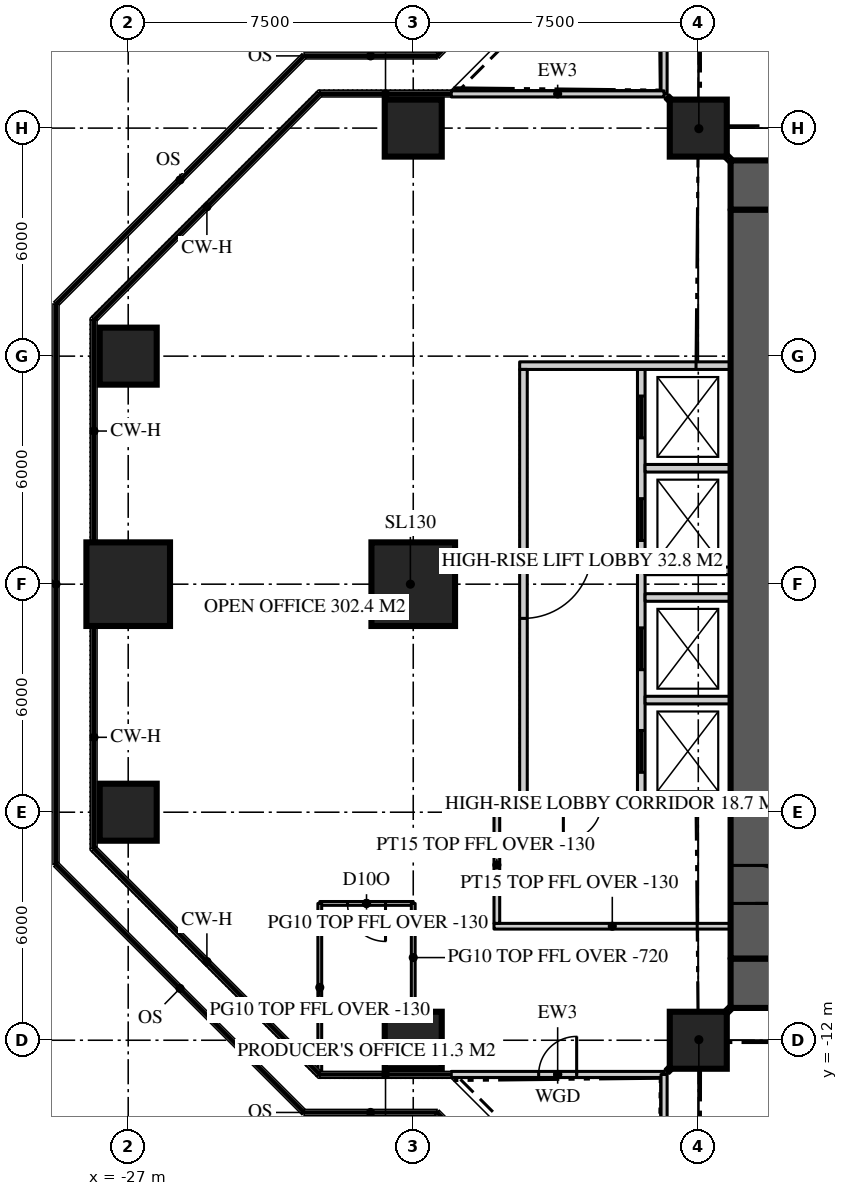
"""IFC4 building model, lengths in metres.
Left out: names, types, materials, properties, quantities, classifications, styles, units other than length and angle.
Written with IfcOpenShell. Run it as: python <this file> out.ifc"""

import sys

from ifc_helpers import new_model, si_unit, direction, frame, frame_2d, origin, origin_2d, place, context, subcontext, project, spatial, rectangle, extrude, element, fill, save


model = new_model("IFC4")
c1 = context("Model", 3, precision=1e-05, world=origin(), true_north=direction((0.0, 1.0)))
c2 = subcontext(c1, "Body", "Model", "MODEL_VIEW")
j1 = project(units=[si_unit("LENGTHUNIT", "METRE"), si_unit("PLANEANGLEUNIT", "RADIAN")], contexts=[c1])
p1 = place(None, origin())
s1 = spatial("IfcSite", under=j1, at=p1, CompositionType="ELEMENT")
p2 = place(p1, origin())
s2 = spatial("IfcBuilding", under=s1, at=p2, CompositionType="ELEMENT")
p3 = place(p2, frame((0.0, 0.0, 236.1)))
s3 = spatial("IfcBuildingStorey", under=s2, at=p3, CompositionType="ELEMENT", Elevation=236.1)
p4 = place(p3, frame((-11.15, 10.5, 0.0), z_axis=(0.0, 0.0, 1.0), x_axis=(1.0, 0.0, 0.0)))
e1 = element("IfcWall", 1, at=p4, inside=s3, PredefinedType="SHEAR", context=c2, shape_type="SweptSolid", body=[
    extrude(rectangle(XDim=22.3, YDim=1.3, at=frame_2d((11.15, 0.0))), origin(), (0.0, 0.0, 1.0), 3.9),
])
p5 = place(p4, frame((4.25, 0.0, 0.0)))
e2 = element("IfcOpeningElement", 2, at=p5, cuts=e1, PredefinedType="OPENING", context=c2, shape_type="SweptSolid", body=[
    extrude(rectangle(XDim=1.8, YDim=2.2, at=frame_2d((0.9, 1.1))), frame((0.0, 0.66, 0.0), z_axis=(0.0, -1.0, 0.0), x_axis=(1.0, 0.0, 0.0)), (0.0, 0.0, 1.0), 1.32),
])
p6 = place(p4, frame((16.25, 0.0, 0.0)))
e3 = element("IfcOpeningElement", 3, at=p6, cuts=e1, PredefinedType="OPENING", context=c2, shape_type="SweptSolid", body=[
    extrude(rectangle(XDim=1.8, YDim=2.2, at=frame_2d((0.9, 1.1))), frame((0.0, 0.66, 0.0), z_axis=(0.0, -1.0, 0.0), x_axis=(1.0, 0.0, 0.0)), (0.0, 0.0, 1.0), 1.32),
])
p7 = place(p3, frame((11.15, -10.5, 0.0), z_axis=(0.0, 0.0, 1.0), x_axis=(-1.0, 0.0, 0.0)))
e4 = element("IfcWall", 4, at=p7, inside=s3, PredefinedType="SHEAR", context=c2, shape_type="SweptSolid", body=[
    extrude(rectangle(XDim=22.3, YDim=1.3, at=frame_2d((11.15, 0.0))), origin(), (0.0, 0.0, 1.0), 3.9),
])
p8 = place(p7, frame((16.25, 0.0, 0.0)))
e5 = element("IfcOpeningElement", 5, at=p8, cuts=e4, PredefinedType="OPENING", context=c2, shape_type="SweptSolid", body=[
    extrude(rectangle(XDim=1.8, YDim=2.2, at=frame_2d((0.9, 1.1))), frame((0.0, 0.66, 0.0), z_axis=(0.0, -1.0, 0.0), x_axis=(1.0, 0.0, 0.0)), (0.0, 0.0, 1.0), 1.32),
])
p9 = place(p7, frame((4.25, 0.0, 0.0)))
e6 = element("IfcOpeningElement", 6, at=p9, cuts=e4, PredefinedType="OPENING", context=c2, shape_type="SweptSolid", body=[
    extrude(rectangle(XDim=1.8, YDim=2.2, at=frame_2d((0.9, 1.1))), frame((0.0, 0.66, 0.0), z_axis=(0.0, -1.0, 0.0), x_axis=(1.0, 0.0, 0.0)), (0.0, 0.0, 1.0), 1.32),
])
p10 = place(p3, frame((-10.5, 9.85, 0.0), z_axis=(0.0, 0.0, 1.0), x_axis=(0.0, -1.0, 0.0)))
e7 = element("IfcWall", 7, at=p10, inside=s3, PredefinedType="SHEAR", context=c2, shape_type="SweptSolid", body=[
    extrude(rectangle(XDim=19.7, YDim=1.3, at=frame_2d((9.85, 0.0))), origin(), (0.0, 0.0, 1.0), 3.9),
])
p11 = place(p10, frame((17.25, 0.0, 0.0)))
e8 = element("IfcOpeningElement", 8, at=p11, cuts=e7, PredefinedType="OPENING", context=c2, shape_type="SweptSolid", body=[
    extrude(rectangle(XDim=1.0, YDim=2.2, at=frame_2d((0.5, 1.1))), frame((0.0, 0.66, 0.0), z_axis=(0.0, -1.0, 0.0), x_axis=(1.0, 0.0, 0.0)), (0.0, 0.0, 1.0), 1.32),
])
for number, where, z_axis, x_axis in (
    (9, (-19.5, -12.0, 0.0), (0.0, 0.0, 1.0), (1.0, 0.0, 0.0)),
    (10, (-12.0, -12.0, 0.0), (0.0, 0.0, 1.0), (1.0, 0.0, 0.0)),
    (11, (-27.0, -6.0, 0.0), (0.0, 0.0, 1.0), (1.0, 0.0, 0.0)),
):
    element("IfcColumn", number, at=place(p3, frame(where, z_axis=z_axis, x_axis=x_axis)), inside=s3, PredefinedType="COLUMN", context=c2, shape_type="SweptSolid", body=[
        extrude(rectangle(XDim=1.5, YDim=1.5, at=origin_2d()), origin(), (0.0, 0.0, 1.0), 3.9),
    ])
for number, where, z_axis, x_axis in (
    (12, (-27.0, 0.0, 0.0), (0.0, 0.0, 1.0), (1.0, 0.0, 0.0)),
    (13, (-19.5, 0.0, 0.0), (0.0, 0.0, 1.0), (1.0, 0.0, 0.0)),
):
    element("IfcColumn", number, at=place(p3, frame(where, z_axis=z_axis, x_axis=x_axis)), inside=s3, PredefinedType="COLUMN", context=c2, shape_type="SweptSolid", body=[
        extrude(rectangle(XDim=2.2, YDim=2.2, at=origin_2d()), origin(), (0.0, 0.0, 1.0), 3.9),
    ])
for number, where, z_axis, x_axis in (
    (14, (-27.0, 6.0, 0.0), (0.0, 0.0, 1.0), (1.0, 0.0, 0.0)),
    (15, (-19.5, 12.0, 0.0), (0.0, 0.0, 1.0), (1.0, 0.0, 0.0)),
    (16, (-12.0, 12.0, 0.0), (0.0, 0.0, 1.0), (1.0, 0.0, 0.0)),
):
    element("IfcColumn", number, at=place(p3, frame(where, z_axis=z_axis, x_axis=x_axis)), inside=s3, PredefinedType="COLUMN", context=c2, shape_type="SweptSolid", body=[
        extrude(rectangle(XDim=1.5, YDim=1.5, at=origin_2d()), origin(), (0.0, 0.0, 1.0), 3.9),
    ])
p12 = place(p3, frame((-12.9, 18.5, 0.0), z_axis=(0.0, 0.0, 1.0), x_axis=(0.0, -1.0, 0.0)))
e17 = element("IfcWall", 17, at=p12, inside=s3, PredefinedType="SOLIDWALL", context=c2, shape_type="SweptSolid", body=[
    extrude(rectangle(XDim=5.6, YDim=0.16, at=frame_2d((2.8, 0.0))), origin(), (0.0, 0.0, 1.0), 3.77),
])
p13 = place(p12, frame((2.3, 0.0, 0.0)))
e18 = element("IfcOpeningElement", 18, at=p13, cuts=e17, PredefinedType="OPENING", context=c2, shape_type="SweptSolid", body=[
    extrude(rectangle(XDim=1.0, YDim=2.2, at=frame_2d((0.5, 1.1))), frame((0.0, 0.09, 0.0), z_axis=(0.0, -1.0, 0.0), x_axis=(1.0, 0.0, 0.0)), (0.0, 0.0, 1.0), 0.18),
])
p14 = place(p3, frame((-12.9, 12.9, 0.0), z_axis=(0.0, 0.0, 1.0), x_axis=(-1.0, 0.0, 0.0)))
e19 = element("IfcWall", 19, at=p14, inside=s3, PredefinedType="SOLIDWALL", context=c2, shape_type="SweptSolid", body=[
    extrude(rectangle(XDim=5.6, YDim=0.16, at=frame_2d((2.8, 0.0))), origin(), (0.0, 0.0, 1.0), 3.77),
])
p15 = place(p3, frame((-18.5, -12.9, 0.0), z_axis=(0.0, 0.0, 1.0), x_axis=(1.0, 0.0, 0.0)))
e20 = element("IfcWall", 20, at=p15, inside=s3, PredefinedType="SOLIDWALL", context=c2, shape_type="SweptSolid", body=[
    extrude(rectangle(XDim=5.6, YDim=0.16, at=frame_2d((2.8, 0.0))), origin(), (0.0, 0.0, 1.0), 3.77),
])
p16 = place(p15, frame((2.3, 0.0, 0.0)))
e21 = element("IfcOpeningElement", 21, at=p16, cuts=e20, PredefinedType="OPENING", context=c2, shape_type="SweptSolid", body=[
    extrude(rectangle(XDim=1.0, YDim=2.2, at=frame_2d((0.5, 1.1))), frame((0.0, 0.09, 0.0), z_axis=(0.0, -1.0, 0.0), x_axis=(1.0, 0.0, 0.0)), (0.0, 0.0, 1.0), 0.18),
])
p17 = place(p3, frame((-12.9, -12.9, 0.0), z_axis=(0.0, 0.0, 1.0), x_axis=(0.0, -1.0, 0.0)))
e22 = element("IfcWall", 22, at=p17, inside=s3, PredefinedType="SOLIDWALL", context=c2, shape_type="SweptSolid", body=[
    extrude(rectangle(XDim=5.6, YDim=0.16, at=frame_2d((2.8, 0.0))), origin(), (0.0, 0.0, 1.0), 3.77),
])
p18 = place(p3, frame((-19.5, -8.4, 0.0), z_axis=(0.0, 0.0, 1.0), x_axis=(-1.0, 0.0, 0.0)))
e23 = element("IfcWall", 23, at=p18, inside=s3, PredefinedType="PARTITIONING", context=c2, shape_type="SweptSolid", body=[
    extrude(rectangle(XDim=2.459, YDim=0.1, at=frame_2d((1.229, 0.0))), origin(), (0.0, 0.0, 1.0), 3.77),
])
p19 = place(p18, frame((0.729, 0.0, 0.0)))
e24 = element("IfcOpeningElement", 24, at=p19, cuts=e23, PredefinedType="OPENING", context=c2, shape_type="SweptSolid", body=[
    extrude(rectangle(XDim=1.0, YDim=2.2, at=frame_2d((0.5, 1.1))), frame((0.0, 0.06, 0.0), z_axis=(0.0, -1.0, 0.0), x_axis=(1.0, 0.0, 0.0)), (0.0, 0.0, 1.0), 0.12),
])
p20 = place(p3, frame((-19.5, -8.4, 0.0), z_axis=(0.0, 0.0, 1.0), x_axis=(0.0, -1.0, 0.0)))
e25 = element("IfcWall", 25, at=p20, inside=s3, PredefinedType="PARTITIONING", context=c2, shape_type="SweptSolid", body=[
    extrude(rectangle(XDim=2.85, YDim=0.1, at=frame_2d((1.425, 0.0))), origin(), (0.0, 0.0, 1.0), 3.18),
])
p21 = place(p3, frame((-21.959, -8.4, 0.0), z_axis=(0.0, 0.0, 1.0), x_axis=(0.0, -1.0, 0.0)))
e26 = element("IfcWall", 26, at=p21, inside=s3, PredefinedType="PARTITIONING", context=c2, shape_type="SweptSolid", body=[
    extrude(rectangle(XDim=4.42, YDim=0.1, at=frame_2d((2.21, 0.0))), origin(), (0.0, 0.0, 1.0), 3.77),
])
p22 = place(p3, frame((-13.5, 5.65, 0.0), z_axis=(0.0, 0.0, 1.0), x_axis=(0.0, -1.0, 0.0)))
e27 = element("IfcWall", 27, at=p22, inside=s3, PredefinedType="SOLIDWALL", context=c2, shape_type="SweptSolid", body=[
    extrude(rectangle(XDim=11.3, YDim=0.2, at=frame_2d((5.65, 0.0))), origin(), (0.0, 0.0, 1.0), 3.7),
])
p23 = place(p22, frame((0.7, 0.0, 0.0)))
e28 = element("IfcOpeningElement", 28, at=p23, cuts=e27, PredefinedType="OPENING", context=c2, shape_type="SweptSolid", body=[
    extrude(rectangle(XDim=1.1, YDim=2.2, at=frame_2d((0.55, 1.1))), frame((0.0, 0.11, 0.0), z_axis=(0.0, -1.0, 0.0), x_axis=(1.0, 0.0, 0.0)), (0.0, 0.0, 1.0), 0.22),
])
p24 = place(p22, frame((3.4, 0.0, 0.0)))
e29 = element("IfcOpeningElement", 29, at=p24, cuts=e27, PredefinedType="OPENING", context=c2, shape_type="SweptSolid", body=[
    extrude(rectangle(XDim=1.1, YDim=2.2, at=frame_2d((0.55, 1.1))), frame((0.0, 0.11, 0.0), z_axis=(0.0, -1.0, 0.0), x_axis=(1.0, 0.0, 0.0)), (0.0, 0.0, 1.0), 0.22),
])
p25 = place(p22, frame((6.8, 0.0, 0.0)))
e30 = element("IfcOpeningElement", 30, at=p25, cuts=e27, PredefinedType="OPENING", context=c2, shape_type="SweptSolid", body=[
    extrude(rectangle(XDim=1.1, YDim=2.2, at=frame_2d((0.55, 1.1))), frame((0.0, 0.11, 0.0), z_axis=(0.0, -1.0, 0.0), x_axis=(1.0, 0.0, 0.0)), (0.0, 0.0, 1.0), 0.22),
])
p26 = place(p22, frame((9.5, 0.0, 0.0)))
e31 = element("IfcOpeningElement", 31, at=p26, cuts=e27, PredefinedType="OPENING", context=c2, shape_type="SweptSolid", body=[
    extrude(rectangle(XDim=1.1, YDim=2.2, at=frame_2d((0.55, 1.1))), frame((0.0, 0.11, 0.0), z_axis=(0.0, -1.0, 0.0), x_axis=(1.0, 0.0, 0.0)), (0.0, 0.0, 1.0), 0.22),
])
p27 = place(p3, frame((-11.15, 5.75, 0.0), z_axis=(0.0, 0.0, 1.0), x_axis=(-1.0, 0.0, 0.0)))
e32 = element("IfcWall", 32, at=p27, inside=s3, PredefinedType="SOLIDWALL", context=c2, shape_type="SweptSolid", body=[
    extrude(rectangle(XDim=5.55, YDim=0.2, at=frame_2d((2.775, 0.0))), origin(), (0.0, 0.0, 1.0), 3.7),
])
p28 = place(p3, frame((-11.15, -5.75, 0.0), z_axis=(0.0, 0.0, 1.0), x_axis=(-1.0, 0.0, 0.0)))
e33 = element("IfcWall", 33, at=p28, inside=s3, PredefinedType="SOLIDWALL", context=c2, shape_type="SweptSolid", body=[
    extrude(rectangle(XDim=5.55, YDim=0.2, at=frame_2d((2.775, 0.0))), origin(), (0.0, 0.0, 1.0), 3.7),
])
p29 = place(p28, frame((3.4, 0.0, 0.0)))
e34 = element("IfcOpeningElement", 34, at=p29, cuts=e33, PredefinedType="OPENING", context=c2, shape_type="SweptSolid", body=[
    extrude(rectangle(XDim=1.0, YDim=2.2, at=frame_2d((0.5, 1.1))), frame((0.0, 0.11, 0.0), z_axis=(0.0, -1.0, 0.0), x_axis=(1.0, 0.0, 0.0)), (0.0, 0.0, 1.0), 0.22),
])
for number, where, z_axis, x_axis in (
    (35, (-11.15, 3.05, 0.0), (0.0, 0.0, 1.0), (-1.0, 0.0, 0.0)),
    (36, (-11.15, 0.35, 0.0), (0.0, 0.0, 1.0), (-1.0, 0.0, 0.0)),
    (37, (-11.15, -0.35, 0.0), (0.0, 0.0, 1.0), (-1.0, 0.0, 0.0)),
    (38, (-11.15, -3.05, 0.0), (0.0, 0.0, 1.0), (-1.0, 0.0, 0.0)),
):
    element("IfcWall", number, at=place(p3, frame(where, z_axis=z_axis, x_axis=x_axis)), inside=s3, PredefinedType="SOLIDWALL", context=c2, shape_type="SweptSolid", body=[
        extrude(rectangle(XDim=2.25, YDim=0.2, at=frame_2d((1.125, 0.0))), origin(), (0.0, 0.0, 1.0), 3.7),
    ])
p30 = place(p3, frame((-16.6, 5.65, 0.0), z_axis=(0.0, 0.0, 1.0), x_axis=(0.0, -1.0, 0.0)))
e39 = element("IfcWall", 39, at=p30, inside=s3, PredefinedType="SOLIDWALL", context=c2, shape_type="SweptSolid", body=[
    extrude(rectangle(XDim=11.3, YDim=0.2, at=frame_2d((5.65, 0.0))), origin(), (0.0, 0.0, 1.0), 3.18),
])
p31 = place(p30, frame((4.75, 0.0, 0.0)))
e40 = element("IfcOpeningElement", 40, at=p31, cuts=e39, PredefinedType="OPENING", context=c2, shape_type="SweptSolid", body=[
    extrude(rectangle(XDim=1.8, YDim=2.2, at=frame_2d((0.9, 1.1))), frame((0.0, 0.11, 0.0), z_axis=(0.0, -1.0, 0.0), x_axis=(1.0, 0.0, 0.0)), (0.0, 0.0, 1.0), 0.22),
])
for number, where, z_axis, x_axis in (
    (41, (-11.15, 11.15, 0.0), (0.0, 0.0, 1.0), (-0.707, 0.707, 0.0)),
    (42, (-11.15, -11.15, 0.0), (0.0, 0.0, 1.0), (-0.707, -0.707, 0.0)),
):
    element("IfcWall", number, at=place(p3, frame(where, z_axis=z_axis, x_axis=x_axis)), inside=s3, PredefinedType="PARTITIONING", context=c2, shape_type="SweptSolid", body=[
        extrude(rectangle(XDim=2.362, YDim=0.15, at=frame_2d((1.181, 0.0))), origin(), (0.0, 0.0, 1.0), 3.22),
    ])
p32 = place(p3, frame((-11.15, -9.0, 0.0), z_axis=(0.0, 0.0, 1.0), x_axis=(-1.0, 0.0, 0.0)))
e43 = element("IfcWall", 43, at=p32, inside=s3, PredefinedType="PARTITIONING", context=c2, shape_type="SweptSolid", body=[
    extrude(rectangle(XDim=6.225, YDim=0.15, at=frame_2d((3.113, 0.0))), origin(), (0.0, 0.0, 1.0), 3.77),
])
p33 = place(p3, frame((-17.3, -5.85, 0.0), z_axis=(0.0, 0.0, 1.0), x_axis=(0.0, -1.0, 0.0)))
e44 = element("IfcWall", 44, at=p33, inside=s3, PredefinedType="PARTITIONING", context=c2, shape_type="SweptSolid", body=[
    extrude(rectangle(XDim=3.075, YDim=0.15, at=frame_2d((1.538, 0.0))), origin(), (0.0, 0.0, 1.0), 3.77),
])
p34 = place(p16, origin())
e45 = element("IfcDoor", 45, at=p34, inside=s3, OperationType="SINGLE_SWING_RIGHT", PredefinedType="DOOR", context=c2, shape_type="SweptSolid", body=[
    extrude(rectangle(XDim=1.0, YDim=2.2, at=frame_2d((0.5, 1.1))), frame((0.0, 0.025, 0.0), z_axis=(0.0, -1.0, 0.0), x_axis=(1.0, 0.0, 0.0)), (0.0, 0.0, 1.0), 0.05),
])
fill(e21, e45)
p35 = place(p11, origin())
e46 = element("IfcDoor", 46, at=p35, inside=s3, OperationType="SINGLE_SWING_RIGHT", PredefinedType="DOOR", context=c2, shape_type="SweptSolid", body=[
    extrude(rectangle(XDim=1.0, YDim=2.2, at=frame_2d((0.5, 1.1))), frame((0.0, 0.025, 0.0), z_axis=(0.0, -1.0, 0.0), x_axis=(1.0, 0.0, 0.0)), (0.0, 0.0, 1.0), 0.05),
])
fill(e8, e46)
p36 = place(p19, origin())
e47 = element("IfcDoor", 47, at=p36, inside=s3, OperationType="SINGLE_SWING_LEFT", PredefinedType="DOOR", context=c2, shape_type="SweptSolid", body=[
    extrude(rectangle(XDim=1.0, YDim=2.2, at=frame_2d((0.5, 1.1))), frame((0.0, 0.025, 0.0), z_axis=(0.0, -1.0, 0.0), x_axis=(1.0, 0.0, 0.0)), (0.0, 0.0, 1.0), 0.05),
])
fill(e24, e47)
p37 = place(p31, origin())
e48 = element("IfcDoor", 48, at=p37, inside=s3, OperationType="DOUBLE_DOOR_DOUBLE_SWING", PredefinedType="DOOR", context=c2, shape_type="SweptSolid", body=[
    extrude(rectangle(XDim=1.8, YDim=2.2, at=frame_2d((0.9, 1.1))), frame((0.0, 0.025, 0.0), z_axis=(0.0, -1.0, 0.0), x_axis=(1.0, 0.0, 0.0)), (0.0, 0.0, 1.0), 0.05),
])
fill(e40, e48)
p38 = place(p23, origin())
e49 = element("IfcDoor", 49, at=p38, inside=s3, OperationType="SLIDING_TO_LEFT", PredefinedType="DOOR", context=c2, shape_type="SweptSolid", body=[
    extrude(rectangle(XDim=1.1, YDim=2.2, at=frame_2d((0.55, 1.1))), frame((0.0, 0.025, 0.0), z_axis=(0.0, -1.0, 0.0), x_axis=(1.0, 0.0, 0.0)), (0.0, 0.0, 1.0), 0.05),
])
fill(e28, e49)
p39 = place(p24, origin())
e50 = element("IfcDoor", 50, at=p39, inside=s3, OperationType="SLIDING_TO_LEFT", PredefinedType="DOOR", context=c2, shape_type="SweptSolid", body=[
    extrude(rectangle(XDim=1.1, YDim=2.2, at=frame_2d((0.55, 1.1))), frame((0.0, 0.025, 0.0), z_axis=(0.0, -1.0, 0.0), x_axis=(1.0, 0.0, 0.0)), (0.0, 0.0, 1.0), 0.05),
])
fill(e29, e50)
p40 = place(p25, origin())
e51 = element("IfcDoor", 51, at=p40, inside=s3, OperationType="SLIDING_TO_LEFT", PredefinedType="DOOR", context=c2, shape_type="SweptSolid", body=[
    extrude(rectangle(XDim=1.1, YDim=2.2, at=frame_2d((0.55, 1.1))), frame((0.0, 0.025, 0.0), z_axis=(0.0, -1.0, 0.0), x_axis=(1.0, 0.0, 0.0)), (0.0, 0.0, 1.0), 0.05),
])
fill(e30, e51)
p41 = place(p26, origin())
e52 = element("IfcDoor", 52, at=p41, inside=s3, OperationType="SLIDING_TO_LEFT", PredefinedType="DOOR", context=c2, shape_type="SweptSolid", body=[
    extrude(rectangle(XDim=1.1, YDim=2.2, at=frame_2d((0.55, 1.1))), frame((0.0, 0.025, 0.0), z_axis=(0.0, -1.0, 0.0), x_axis=(1.0, 0.0, 0.0)), (0.0, 0.0, 1.0), 0.05),
])
fill(e31, e52)
p42 = place(p29, origin())
e53 = element("IfcDoor", 53, at=p42, inside=s3, OperationType="SINGLE_SWING_RIGHT", PredefinedType="DOOR", context=c2, shape_type="SweptSolid", body=[
    extrude(rectangle(XDim=1.0, YDim=2.2, at=frame_2d((0.5, 1.1))), frame((0.0, 0.025, 0.0), z_axis=(0.0, -1.0, 0.0), x_axis=(1.0, 0.0, 0.0)), (0.0, 0.0, 1.0), 0.05),
])
fill(e34, e53)
save(model, sys.argv[1])
